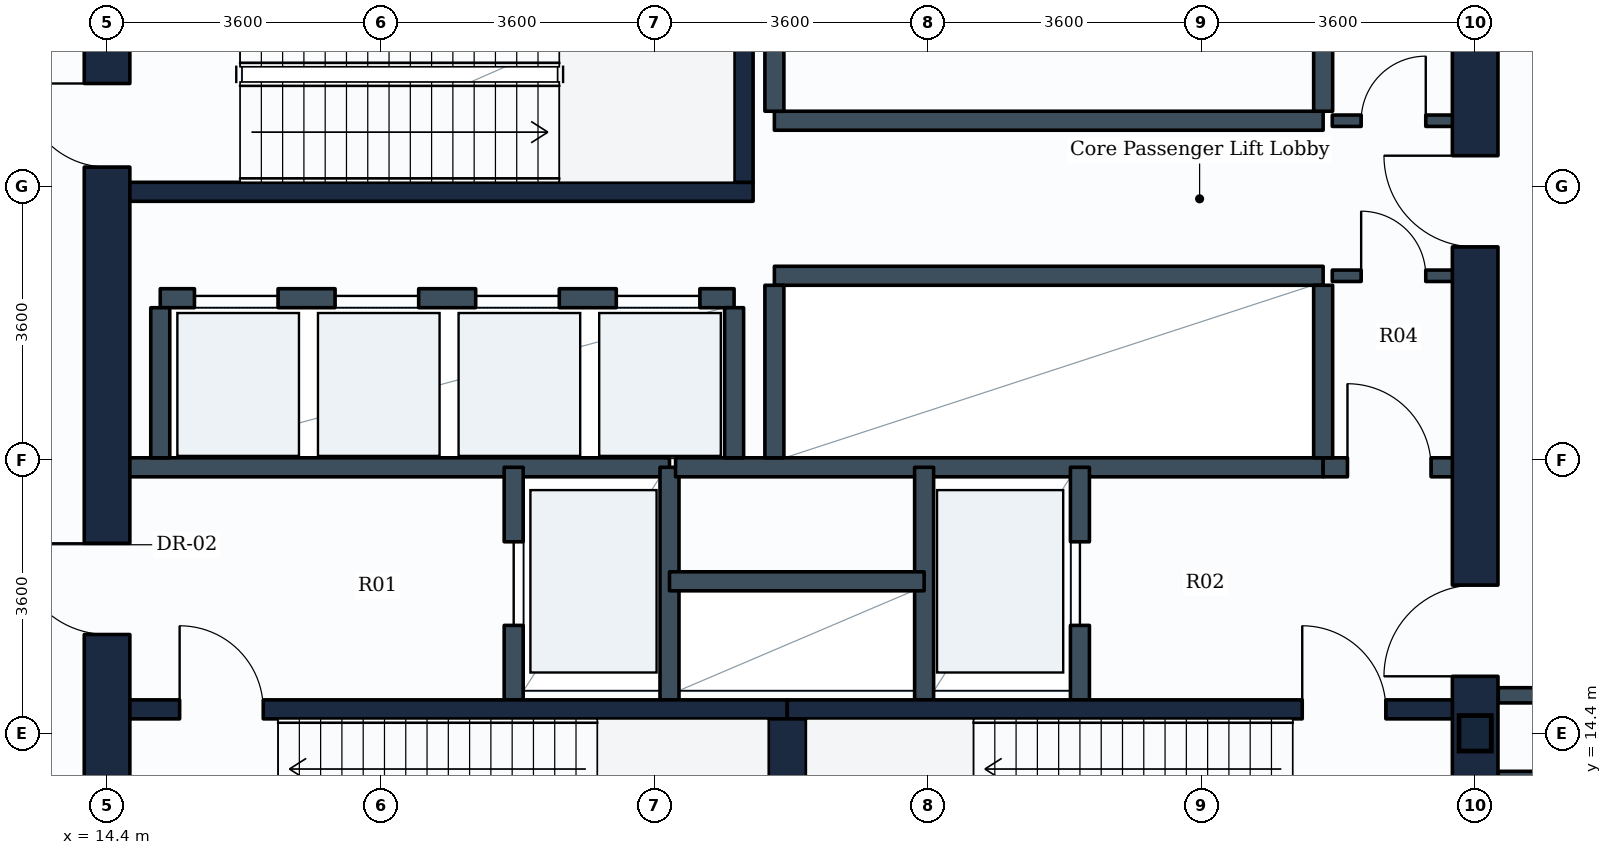
"""IFC4 building model, lengths in metres.
Left out: names, types, materials, properties, quantities, classifications, styles, units other than length and angle.
Written with IfcOpenShell. Run it as: python <this file> out.ifc"""

import sys

from ifc_helpers import new_model, si_unit, direction, frame, frame_2d, origin, origin_2d, place, context, subcontext, project, spatial, rectangle, i_section, extrude, element, fill, save


model = new_model("IFC4")
c1 = context("Model", 3, precision=1e-05, world=origin(), true_north=direction((0.0, 1.0)))
c2 = subcontext(c1, "Body", "Model", "MODEL_VIEW")
j1 = project(units=[si_unit("LENGTHUNIT", "METRE"), si_unit("PLANEANGLEUNIT", "RADIAN")], contexts=[c1])
p1 = place(None, origin())
s1 = spatial("IfcSite", under=j1, at=p1, CompositionType="ELEMENT")
p2 = place(p1, origin())
s2 = spatial("IfcBuilding", under=s1, at=p2, CompositionType="ELEMENT")
p3 = place(p2, frame((0.0, 0.0, 74.7)))
s3 = spatial("IfcBuildingStorey", under=s2, at=p3, CompositionType="ELEMENT", Elevation=74.7)
p4 = place(p3, frame((32.4, 14.4, 0.0), z_axis=(0.0, 0.0, 1.0), x_axis=(1.0, 0.0, 0.0)))
e1 = element("IfcColumn", 1, at=p4, inside=s3, PredefinedType="COLUMN", context=c2, shape_type="SweptSolid", body=[
    extrude(i_section(OverallWidth=0.424, OverallDepth=0.467, WebThickness=0.033, FlangeThickness=0.053, FilletRadius=0.015, at=origin_2d()), origin(), (0.0, 0.0, 1.0), 5.4),
])
p5 = place(p3, frame((14.4, 10.8, 0.0), z_axis=(0.0, 0.0, 1.0), x_axis=(0.0, 1.0, 0.0)))
e2 = element("IfcWall", 2, at=p5, inside=s3, PredefinedType="SHEAR", context=c2, shape_type="SweptSolid", body=[
    extrude(rectangle(XDim=14.4, YDim=0.6, at=frame_2d((7.2, 0.0))), origin(), (0.0, 0.0, 1.0), 5.08),
])
p6 = place(p5, frame((11.05, 0.0, 0.0)))
e3 = element("IfcOpeningElement", 3, at=p6, cuts=e2, PredefinedType="OPENING", context=c2, shape_type="SweptSolid", body=[
    extrude(rectangle(XDim=1.1, YDim=2.1, at=frame_2d((0.55, 1.05))), frame((0.0, 0.31, 0.0), z_axis=(0.0, -1.0, 0.0), x_axis=(1.0, 0.0, 0.0)), (0.0, 0.0, 1.0), 0.62),
])
p7 = place(p5, frame((4.9, 0.0, 0.0)))
e4 = element("IfcOpeningElement", 4, at=p7, cuts=e2, PredefinedType="OPENING", context=c2, shape_type="SweptSolid", body=[
    extrude(rectangle(XDim=1.2, YDim=2.1, at=frame_2d((0.6, 1.05))), frame((0.0, 0.31, 0.0), z_axis=(0.0, -1.0, 0.0), x_axis=(1.0, 0.0, 0.0)), (0.0, 0.0, 1.0), 0.62),
])
p8 = place(p3, frame((32.4, 10.8, 0.0), z_axis=(0.0, 0.0, 1.0), x_axis=(0.0, 1.0, 0.0)))
e5 = element("IfcWall", 5, at=p8, inside=s3, PredefinedType="SHEAR", context=c2, shape_type="SweptSolid", body=[
    extrude(rectangle(XDim=14.4, YDim=0.6, at=frame_2d((7.2, 0.0))), origin(), (0.0, 0.0, 1.0), 5.08),
])
p9 = place(p8, frame((4.35, 0.0, 0.0)))
e6 = element("IfcOpeningElement", 6, at=p9, cuts=e5, PredefinedType="OPENING", context=c2, shape_type="SweptSolid", body=[
    extrude(rectangle(XDim=1.2, YDim=2.1, at=frame_2d((0.6, 1.05))), frame((0.0, 0.31, 0.0), z_axis=(0.0, -1.0, 0.0), x_axis=(1.0, 0.0, 0.0)), (0.0, 0.0, 1.0), 0.62),
])
p10 = place(p8, frame((10.0, 0.0, 0.0)))
e7 = element("IfcOpeningElement", 7, at=p10, cuts=e5, PredefinedType="OPENING", context=c2, shape_type="SweptSolid", body=[
    extrude(rectangle(XDim=1.2, YDim=2.1, at=frame_2d((0.6, 1.05))), frame((0.0, 0.31, 0.0), z_axis=(0.0, -1.0, 0.0), x_axis=(1.0, 0.0, 0.0)), (0.0, 0.0, 1.0), 0.62),
])
p11 = place(p3, frame((14.7, 14.715, 0.0), z_axis=(0.0, 0.0, 1.0), x_axis=(1.0, 0.0, 0.0)))
e8 = element("IfcWall", 8, at=p11, inside=s3, PredefinedType="SHEAR", context=c2, shape_type="SweptSolid", body=[
    extrude(rectangle(XDim=8.65, YDim=0.25, at=frame_2d((4.325, 0.0))), origin(), (0.0, 0.0, 1.0), 5.08),
])
p12 = place(p11, frame((0.655, 0.0, 0.0)))
e9 = element("IfcOpeningElement", 9, at=p12, cuts=e8, PredefinedType="OPENING", context=c2, shape_type="SweptSolid", body=[
    extrude(rectangle(XDim=1.1, YDim=2.1, at=frame_2d((0.55, 1.05))), frame((0.0, 0.135, 0.0), z_axis=(0.0, -1.0, 0.0), x_axis=(1.0, 0.0, 0.0)), (0.0, 0.0, 1.0), 0.27),
])
p13 = place(p3, frame((23.35, 14.715, 0.0), z_axis=(0.0, 0.0, 1.0), x_axis=(1.0, 0.0, 0.0)))
e10 = element("IfcWall", 10, at=p13, inside=s3, PredefinedType="SHEAR", context=c2, shape_type="SweptSolid", body=[
    extrude(rectangle(XDim=8.75, YDim=0.25, at=frame_2d((4.375, 0.0))), origin(), (0.0, 0.0, 1.0), 5.08),
])
p14 = place(p13, frame((6.775, 0.0, 0.0)))
e11 = element("IfcOpeningElement", 11, at=p14, cuts=e10, PredefinedType="OPENING", context=c2, shape_type="SweptSolid", body=[
    extrude(rectangle(XDim=1.1, YDim=2.1, at=frame_2d((0.55, 1.05))), frame((0.0, 0.135, 0.0), z_axis=(0.0, -1.0, 0.0), x_axis=(1.0, 0.0, 0.0)), (0.0, 0.0, 1.0), 0.27),
])
p15 = place(p3, frame((23.35, 11.75, 0.0), z_axis=(0.0, 0.0, 1.0), x_axis=(0.0, 1.0, 0.0)))
e12 = element("IfcWall", 12, at=p15, inside=s3, PredefinedType="SHEAR", context=c2, shape_type="SweptSolid", body=[
    extrude(rectangle(XDim=2.84, YDim=0.5, at=frame_2d((1.42, 0.0))), origin(), (0.0, 0.0, 1.0), 5.08),
])
p16 = place(p3, frame((14.7, 21.525, 0.0), z_axis=(0.0, 0.0, 1.0), x_axis=(1.0, 0.0, 0.0)))
e13 = element("IfcWall", 13, at=p16, inside=s3, PredefinedType="SHEAR", context=c2, shape_type="SweptSolid", body=[
    extrude(rectangle(XDim=8.2, YDim=0.25, at=frame_2d((4.1, 0.0))), origin(), (0.0, 0.0, 1.0), 5.08),
])
p17 = place(p3, frame((22.775, 21.65, 0.0), z_axis=(0.0, 0.0, 1.0), x_axis=(0.0, 1.0, 0.0)))
e14 = element("IfcWall", 14, at=p17, inside=s3, PredefinedType="SHEAR", context=c2, shape_type="SweptSolid", body=[
    extrude(rectangle(XDim=2.84, YDim=0.25, at=frame_2d((1.42, 0.0))), origin(), (0.0, 0.0, 1.0), 5.08),
])
p18 = place(p3, frame((14.65, 17.9, 0.0), z_axis=(0.0, 0.0, 1.0), x_axis=(1.0, 0.0, 0.0)))
e15 = element("IfcWall", 15, at=p18, inside=s3, PredefinedType="PARTITIONING", context=c2, shape_type="SweptSolid", body=[
    extrude(rectangle(XDim=7.15, YDim=0.25, at=frame_2d((3.575, 0.0))), origin(), (0.0, 0.0, 1.0), 5.065),
])
p19 = place(p3, frame((19.75, 14.84, 0.0), z_axis=(0.0, 0.0, 1.0), x_axis=(0.0, 1.0, 0.0)))
e16 = element("IfcWall", 16, at=p19, inside=s3, PredefinedType="PARTITIONING", context=c2, shape_type="SweptSolid", body=[
    extrude(rectangle(XDim=3.06, YDim=0.25, at=frame_2d((1.53, 0.0))), origin(), (0.0, 0.0, 1.0), 5.065),
])
p20 = place(p19, frame((0.98, 0.0, 0.0)))
e17 = element("IfcOpeningElement", 17, at=p20, cuts=e16, PredefinedType="OPENING", context=c2, shape_type="SweptSolid", body=[
    extrude(rectangle(XDim=1.1, YDim=2.1, at=frame_2d((0.55, 1.05))), frame((0.0, 0.135, 0.0), z_axis=(0.0, -1.0, 0.0), x_axis=(1.0, 0.0, 0.0)), (0.0, 0.0, 1.0), 0.27),
])
p21 = place(p3, frame((21.8, 14.84, 0.0), z_axis=(0.0, 0.0, 1.0), x_axis=(0.0, 1.0, 0.0)))
e18 = element("IfcWall", 18, at=p21, inside=s3, PredefinedType="PARTITIONING", context=c2, shape_type="SweptSolid", body=[
    extrude(rectangle(XDim=3.06, YDim=0.25, at=frame_2d((1.53, 0.0))), origin(), (0.0, 0.0, 1.0), 5.065),
])
p22 = place(p3, frame((21.88, 17.9, 0.0), z_axis=(0.0, 0.0, 1.0), x_axis=(1.0, 0.0, 0.0)))
e19 = element("IfcWall", 19, at=p22, inside=s3, PredefinedType="PARTITIONING", context=c2, shape_type="SweptSolid", body=[
    extrude(rectangle(XDim=8.52, YDim=0.25, at=frame_2d((4.26, 0.0))), origin(), (0.0, 0.0, 1.0), 5.065),
])
p23 = place(p3, frame((30.4, 17.9, 0.0), z_axis=(0.0, 0.0, 1.0), x_axis=(1.0, 0.0, 0.0)))
e20 = element("IfcWall", 20, at=p23, inside=s3, PredefinedType="PARTITIONING", context=c2, shape_type="SweptSolid", body=[
    extrude(rectangle(XDim=1.75, YDim=0.25, at=frame_2d((0.875, 0.0))), origin(), (0.0, 0.0, 1.0), 5.065),
])
p24 = place(p23, frame((0.32, 0.0, 0.0)))
e21 = element("IfcOpeningElement", 21, at=p24, cuts=e20, PredefinedType="OPENING", context=c2, shape_type="SweptSolid", body=[
    extrude(rectangle(XDim=1.1, YDim=2.1, at=frame_2d((0.55, 1.05))), frame((0.0, 0.135, 0.0), z_axis=(0.0, -1.0, 0.0), x_axis=(1.0, 0.0, 0.0)), (0.0, 0.0, 1.0), 0.27),
])
p25 = place(p3, frame((25.15, 14.84, 0.0), z_axis=(0.0, 0.0, 1.0), x_axis=(0.0, 1.0, 0.0)))
e22 = element("IfcWall", 22, at=p25, inside=s3, PredefinedType="PARTITIONING", context=c2, shape_type="SweptSolid", body=[
    extrude(rectangle(XDim=3.06, YDim=0.25, at=frame_2d((1.53, 0.0))), origin(), (0.0, 0.0, 1.0), 5.065),
])
p26 = place(p3, frame((27.2, 14.84, 0.0), z_axis=(0.0, 0.0, 1.0), x_axis=(0.0, 1.0, 0.0)))
e23 = element("IfcWall", 23, at=p26, inside=s3, PredefinedType="PARTITIONING", context=c2, shape_type="SweptSolid", body=[
    extrude(rectangle(XDim=3.06, YDim=0.25, at=frame_2d((1.53, 0.0))), origin(), (0.0, 0.0, 1.0), 5.065),
])
p27 = place(p26, frame((0.98, 0.0, 0.0)))
e24 = element("IfcOpeningElement", 24, at=p27, cuts=e23, PredefinedType="OPENING", context=c2, shape_type="SweptSolid", body=[
    extrude(rectangle(XDim=1.1, YDim=2.1, at=frame_2d((0.55, 1.05))), frame((0.0, 0.135, 0.0), z_axis=(0.0, -1.0, 0.0), x_axis=(1.0, 0.0, 0.0)), (0.0, 0.0, 1.0), 0.27),
])
p28 = place(p3, frame((21.8, 16.4, 0.0), z_axis=(0.0, 0.0, 1.0), x_axis=(1.0, 0.0, 0.0)))
e25 = element("IfcWall", 25, at=p28, inside=s3, PredefinedType="PARTITIONING", context=c2, shape_type="SweptSolid", body=[
    extrude(rectangle(XDim=3.35, YDim=0.25, at=frame_2d((1.675, 0.0))), origin(), (0.0, 0.0, 1.0), 5.065),
])
p29 = place(p3, frame((15.1, 20.125, 0.0), z_axis=(0.0, 0.0, 1.0), x_axis=(1.0, 0.0, 0.0)))
e26 = element("IfcWall", 26, at=p29, inside=s3, PredefinedType="PARTITIONING", context=c2, shape_type="SweptSolid", body=[
    extrude(rectangle(XDim=7.55, YDim=0.25, at=frame_2d((3.775, 0.0))), origin(), (0.0, 0.0, 1.0), 5.065),
])
p30 = place(p29, frame((0.45, 0.0, 0.0)))
e27 = element("IfcOpeningElement", 27, at=p30, cuts=e26, PredefinedType="OPENING", context=c2, shape_type="SweptSolid", body=[
    extrude(rectangle(XDim=1.1, YDim=2.1, at=frame_2d((0.55, 1.05))), frame((0.0, 0.135, 0.0), z_axis=(0.0, -1.0, 0.0), x_axis=(1.0, 0.0, 0.0)), (0.0, 0.0, 1.0), 0.27),
])
p31 = place(p29, frame((2.3, 0.0, 0.0)))
e28 = element("IfcOpeningElement", 28, at=p31, cuts=e26, PredefinedType="OPENING", context=c2, shape_type="SweptSolid", body=[
    extrude(rectangle(XDim=1.1, YDim=2.1, at=frame_2d((0.55, 1.05))), frame((0.0, 0.135, 0.0), z_axis=(0.0, -1.0, 0.0), x_axis=(1.0, 0.0, 0.0)), (0.0, 0.0, 1.0), 0.27),
])
p32 = place(p29, frame((4.15, 0.0, 0.0)))
e29 = element("IfcOpeningElement", 29, at=p32, cuts=e26, PredefinedType="OPENING", context=c2, shape_type="SweptSolid", body=[
    extrude(rectangle(XDim=1.1, YDim=2.1, at=frame_2d((0.55, 1.05))), frame((0.0, 0.135, 0.0), z_axis=(0.0, -1.0, 0.0), x_axis=(1.0, 0.0, 0.0)), (0.0, 0.0, 1.0), 0.27),
])
p33 = place(p29, frame((6.0, 0.0, 0.0)))
e30 = element("IfcOpeningElement", 30, at=p33, cuts=e26, PredefinedType="OPENING", context=c2, shape_type="SweptSolid", body=[
    extrude(rectangle(XDim=1.1, YDim=2.1, at=frame_2d((0.55, 1.05))), frame((0.0, 0.135, 0.0), z_axis=(0.0, -1.0, 0.0), x_axis=(1.0, 0.0, 0.0)), (0.0, 0.0, 1.0), 0.27),
])
for number, where, z_axis, x_axis in (
    (31, (15.1, 18.025, 0.0), (0.0, 0.0, 1.0), (0.0, 1.0, 0.0)),
    (32, (22.65, 18.025, 0.0), (0.0, 0.0, 1.0), (0.0, 1.0, 0.0)),
):
    element("IfcWall", number, at=place(p3, frame(where, z_axis=z_axis, x_axis=x_axis)), inside=s3, PredefinedType="PARTITIONING", context=c2, shape_type="SweptSolid", body=[
        extrude(rectangle(XDim=1.975, YDim=0.25, at=frame_2d((0.988, 0.0))), origin(), (0.0, 0.0, 1.0), 5.065),
    ])
p34 = place(p3, frame((23.18, 20.42, 0.0), z_axis=(0.0, 0.0, 1.0), x_axis=(1.0, 0.0, 0.0)))
e33 = element("IfcWall", 33, at=p34, inside=s3, PredefinedType="PARTITIONING", context=c2, shape_type="SweptSolid", body=[
    extrude(rectangle(XDim=7.22, YDim=0.25, at=frame_2d((3.61, 0.0))), origin(), (0.0, 0.0, 1.0), 5.065),
])
for number, where, z_axis, x_axis in (
    (34, (23.18, 18.025, 0.0), (0.0, 0.0, 1.0), (0.0, 1.0, 0.0)),
    (35, (30.4, 18.025, 0.0), (0.0, 0.0, 1.0), (0.0, 1.0, 0.0)),
):
    element("IfcWall", number, at=place(p3, frame(where, z_axis=z_axis, x_axis=x_axis)), inside=s3, PredefinedType="PARTITIONING", context=c2, shape_type="SweptSolid", body=[
        extrude(rectangle(XDim=2.27, YDim=0.25, at=frame_2d((1.135, 0.0))), origin(), (0.0, 0.0, 1.0), 5.065),
    ])
p35 = place(p3, frame((23.18, 22.46, 0.0), z_axis=(0.0, 0.0, 1.0), x_axis=(1.0, 0.0, 0.0)))
e36 = element("IfcWall", 36, at=p35, inside=s3, PredefinedType="PARTITIONING", context=c2, shape_type="SweptSolid", body=[
    extrude(rectangle(XDim=7.22, YDim=0.25, at=frame_2d((3.61, 0.0))), origin(), (0.0, 0.0, 1.0), 5.065),
])
for number, where, z_axis, x_axis in (
    (37, (23.18, 22.585, 0.0), (0.0, 0.0, 1.0), (0.0, 1.0, 0.0)),
    (38, (30.4, 22.585, 0.0), (0.0, 0.0, 1.0), (0.0, 1.0, 0.0)),
):
    element("IfcWall", number, at=place(p3, frame(where, z_axis=z_axis, x_axis=x_axis)), inside=s3, PredefinedType="PARTITIONING", context=c2, shape_type="SweptSolid", body=[
        extrude(rectangle(XDim=2.315, YDim=0.25, at=frame_2d((1.157, 0.0))), origin(), (0.0, 0.0, 1.0), 5.065),
    ])
p36 = place(p3, frame((30.52, 22.46, 0.0), z_axis=(0.0, 0.0, 1.0), x_axis=(1.0, 0.0, 0.0)))
e39 = element("IfcWall", 39, at=p36, inside=s3, PredefinedType="PARTITIONING", context=c2, shape_type="SweptSolid", body=[
    extrude(rectangle(XDim=1.63, YDim=0.15, at=frame_2d((0.815, 0.0))), origin(), (0.0, 0.0, 1.0), 5.065),
])
p37 = place(p36, frame((0.38, 0.0, 0.0)))
e40 = element("IfcOpeningElement", 40, at=p37, cuts=e39, PredefinedType="OPENING", context=c2, shape_type="SweptSolid", body=[
    extrude(rectangle(XDim=0.85, YDim=2.1, at=frame_2d((0.425, 1.05))), frame((0.0, 0.085, 0.0), z_axis=(0.0, -1.0, 0.0), x_axis=(1.0, 0.0, 0.0)), (0.0, 0.0, 1.0), 0.17),
])
p38 = place(p3, frame((30.52, 20.42, 0.0), z_axis=(0.0, 0.0, 1.0), x_axis=(1.0, 0.0, 0.0)))
e41 = element("IfcWall", 41, at=p38, inside=s3, PredefinedType="PARTITIONING", context=c2, shape_type="SweptSolid", body=[
    extrude(rectangle(XDim=1.63, YDim=0.15, at=frame_2d((0.815, 0.0))), origin(), (0.0, 0.0, 1.0), 5.065),
])
p39 = place(p38, frame((0.38, 0.0, 0.0)))
e42 = element("IfcOpeningElement", 42, at=p39, cuts=e41, PredefinedType="OPENING", context=c2, shape_type="SweptSolid", body=[
    extrude(rectangle(XDim=0.85, YDim=2.1, at=frame_2d((0.425, 1.05))), frame((0.0, 0.085, 0.0), z_axis=(0.0, -1.0, 0.0), x_axis=(1.0, 0.0, 0.0)), (0.0, 0.0, 1.0), 0.17),
])
for number, where, z_axis, x_axis in (
    (43, (32.704, 13.8, 0.0), (0.0, 0.0, 1.0), (1.0, 0.0, 0.0)),
    (44, (32.704, 14.9, 0.0), (0.0, 0.0, 1.0), (1.0, 0.0, 0.0)),
):
    element("IfcWall", number, at=place(p3, frame(where, z_axis=z_axis, x_axis=x_axis)), inside=s3, PredefinedType="PARTITIONING", context=c2, shape_type="SweptSolid", body=[
        extrude(rectangle(XDim=18.246, YDim=0.2, at=frame_2d((9.123, 0.0))), origin(), (0.0, 0.0, 1.0), 3.58),
    ])
p40 = place(p12, origin())
e45 = element("IfcDoor", 45, at=p40, inside=s3, OperationType="SINGLE_SWING_LEFT", PredefinedType="DOOR", context=c2, shape_type="SweptSolid", body=[
    extrude(rectangle(XDim=1.1, YDim=2.1, at=frame_2d((0.55, 1.05))), frame((0.0, 0.025, 0.0), z_axis=(0.0, -1.0, 0.0), x_axis=(1.0, 0.0, 0.0)), (0.0, 0.0, 1.0), 0.05),
])
fill(e9, e45)
p41 = place(p14, origin())
e46 = element("IfcDoor", 46, at=p41, inside=s3, OperationType="SINGLE_SWING_LEFT", PredefinedType="DOOR", context=c2, shape_type="SweptSolid", body=[
    extrude(rectangle(XDim=1.1, YDim=2.1, at=frame_2d((0.55, 1.05))), frame((0.0, 0.025, 0.0), z_axis=(0.0, -1.0, 0.0), x_axis=(1.0, 0.0, 0.0)), (0.0, 0.0, 1.0), 0.05),
])
fill(e11, e46)
p42 = place(p6, origin())
e47 = element("IfcDoor", 47, at=p42, inside=s3, OperationType="SINGLE_SWING_RIGHT", PredefinedType="DOOR", context=c2, shape_type="SweptSolid", body=[
    extrude(rectangle(XDim=1.1, YDim=2.1, at=frame_2d((0.55, 1.05))), frame((0.0, 0.025, 0.0), z_axis=(0.0, -1.0, 0.0), x_axis=(1.0, 0.0, 0.0)), (0.0, 0.0, 1.0), 0.05),
])
fill(e3, e47)
p43 = place(p20, origin())
e48 = element("IfcDoor", 48, at=p43, inside=s3, OperationType="SLIDING_TO_LEFT", PredefinedType="DOOR", context=c2, shape_type="SweptSolid", body=[
    extrude(rectangle(XDim=1.1, YDim=2.1, at=frame_2d((0.55, 1.05))), frame((0.0, 0.025, 0.0), z_axis=(0.0, -1.0, 0.0), x_axis=(1.0, 0.0, 0.0)), (0.0, 0.0, 1.0), 0.05),
])
fill(e17, e48)
p44 = place(p27, origin())
e49 = element("IfcDoor", 49, at=p44, inside=s3, OperationType="SLIDING_TO_LEFT", PredefinedType="DOOR", context=c2, shape_type="SweptSolid", body=[
    extrude(rectangle(XDim=1.1, YDim=2.1, at=frame_2d((0.55, 1.05))), frame((0.0, 0.025, 0.0), z_axis=(0.0, -1.0, 0.0), x_axis=(1.0, 0.0, 0.0)), (0.0, 0.0, 1.0), 0.05),
])
fill(e24, e49)
p45 = place(p7, origin())
e50 = element("IfcDoor", 50, at=p45, inside=s3, OperationType="SINGLE_SWING_RIGHT", PredefinedType="DOOR", context=c2, shape_type="SweptSolid", body=[
    extrude(rectangle(XDim=1.2, YDim=2.1, at=frame_2d((0.6, 1.05))), frame((0.0, 0.025, 0.0), z_axis=(0.0, -1.0, 0.0), x_axis=(1.0, 0.0, 0.0)), (0.0, 0.0, 1.0), 0.05),
])
fill(e4, e50)
p46 = place(p9, origin())
e51 = element("IfcDoor", 51, at=p46, inside=s3, OperationType="SINGLE_SWING_LEFT", PredefinedType="DOOR", context=c2, shape_type="SweptSolid", body=[
    extrude(rectangle(XDim=1.2, YDim=2.1, at=frame_2d((0.6, 1.05))), frame((0.0, 0.025, 0.0), z_axis=(0.0, -1.0, 0.0), x_axis=(1.0, 0.0, 0.0)), (0.0, 0.0, 1.0), 0.05),
])
fill(e6, e51)
p47 = place(p24, origin())
e52 = element("IfcDoor", 52, at=p47, inside=s3, OperationType="SINGLE_SWING_LEFT", PredefinedType="DOOR", context=c2, shape_type="SweptSolid", body=[
    extrude(rectangle(XDim=1.1, YDim=2.1, at=frame_2d((0.55, 1.05))), frame((0.0, 0.025, 0.0), z_axis=(0.0, -1.0, 0.0), x_axis=(1.0, 0.0, 0.0)), (0.0, 0.0, 1.0), 0.05),
])
fill(e21, e52)
p48 = place(p30, origin())
e53 = element("IfcDoor", 53, at=p48, inside=s3, OperationType="SLIDING_TO_LEFT", PredefinedType="DOOR", context=c2, shape_type="SweptSolid", body=[
    extrude(rectangle(XDim=1.1, YDim=2.1, at=frame_2d((0.55, 1.05))), frame((0.0, 0.025, 0.0), z_axis=(0.0, -1.0, 0.0), x_axis=(1.0, 0.0, 0.0)), (0.0, 0.0, 1.0), 0.05),
])
fill(e27, e53)
p49 = place(p31, origin())
e54 = element("IfcDoor", 54, at=p49, inside=s3, OperationType="SLIDING_TO_LEFT", PredefinedType="DOOR", context=c2, shape_type="SweptSolid", body=[
    extrude(rectangle(XDim=1.1, YDim=2.1, at=frame_2d((0.55, 1.05))), frame((0.0, 0.025, 0.0), z_axis=(0.0, -1.0, 0.0), x_axis=(1.0, 0.0, 0.0)), (0.0, 0.0, 1.0), 0.05),
])
fill(e28, e54)
p50 = place(p32, origin())
e55 = element("IfcDoor", 55, at=p50, inside=s3, OperationType="SLIDING_TO_LEFT", PredefinedType="DOOR", context=c2, shape_type="SweptSolid", body=[
    extrude(rectangle(XDim=1.1, YDim=2.1, at=frame_2d((0.55, 1.05))), frame((0.0, 0.025, 0.0), z_axis=(0.0, -1.0, 0.0), x_axis=(1.0, 0.0, 0.0)), (0.0, 0.0, 1.0), 0.05),
])
fill(e29, e55)
p51 = place(p33, origin())
e56 = element("IfcDoor", 56, at=p51, inside=s3, OperationType="SLIDING_TO_LEFT", PredefinedType="DOOR", context=c2, shape_type="SweptSolid", body=[
    extrude(rectangle(XDim=1.1, YDim=2.1, at=frame_2d((0.55, 1.05))), frame((0.0, 0.025, 0.0), z_axis=(0.0, -1.0, 0.0), x_axis=(1.0, 0.0, 0.0)), (0.0, 0.0, 1.0), 0.05),
])
fill(e30, e56)
p52 = place(p10, origin())
e57 = element("IfcDoor", 57, at=p52, inside=s3, OperationType="SINGLE_SWING_RIGHT", PredefinedType="DOOR", context=c2, shape_type="SweptSolid", body=[
    extrude(rectangle(XDim=1.2, YDim=2.1, at=frame_2d((0.6, 1.05))), frame((0.0, 0.025, 0.0), z_axis=(0.0, -1.0, 0.0), x_axis=(1.0, 0.0, 0.0)), (0.0, 0.0, 1.0), 0.05),
])
fill(e7, e57)
p53 = place(p37, origin())
e58 = element("IfcDoor", 58, at=p53, inside=s3, OperationType="SINGLE_SWING_RIGHT", PredefinedType="DOOR", context=c2, shape_type="SweptSolid", body=[
    extrude(rectangle(XDim=0.85, YDim=2.1, at=frame_2d((0.425, 1.05))), frame((0.0, 0.025, 0.0), z_axis=(0.0, -1.0, 0.0), x_axis=(1.0, 0.0, 0.0)), (0.0, 0.0, 1.0), 0.05),
])
fill(e40, e58)
p54 = place(p39, origin())
e59 = element("IfcDoor", 59, at=p54, inside=s3, OperationType="SINGLE_SWING_LEFT", PredefinedType="DOOR", context=c2, shape_type="SweptSolid", body=[
    extrude(rectangle(XDim=0.85, YDim=2.1, at=frame_2d((0.425, 1.05))), frame((0.0, 0.025, 0.0), z_axis=(0.0, -1.0, 0.0), x_axis=(1.0, 0.0, 0.0)), (0.0, 0.0, 1.0), 0.05),
])
fill(e42, e59)
save(model, sys.argv[1])
